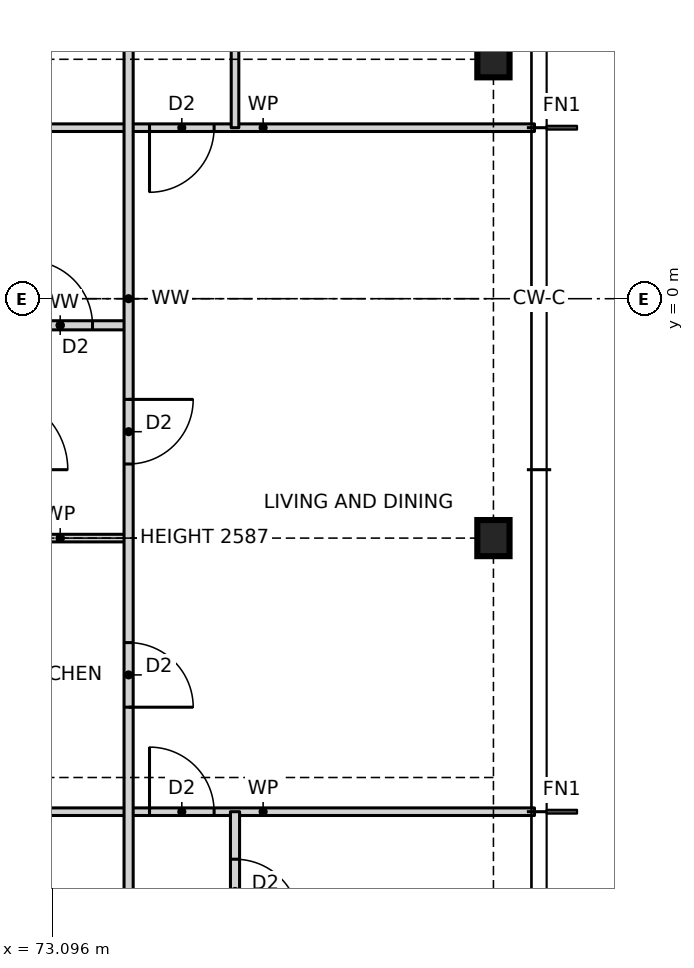
"""IFC4 building model, lengths in metres.
Left out: names, types, materials, properties, quantities, classifications, styles, units other than length and angle.
Written with IfcOpenShell. Run it as: python <this file> out.ifc"""

import sys

from ifc_helpers import new_model, si_unit, direction, frame, frame_2d, origin, origin_2d, place, context, subcontext, project, spatial, rectangle, i_section, extrude, element, fill, save


model = new_model("IFC4")
c1 = context("Model", 3, precision=1e-05, world=origin(), true_north=direction((0.0, 1.0)))
c2 = subcontext(c1, "Body", "Model", "MODEL_VIEW")
j1 = project(units=[si_unit("LENGTHUNIT", "METRE"), si_unit("PLANEANGLEUNIT", "RADIAN")], contexts=[c1])
p1 = place(None, origin())
s1 = spatial("IfcSite", under=j1, at=p1, CompositionType="ELEMENT")
p2 = place(p1, origin())
s2 = spatial("IfcBuilding", under=s1, at=p2, CompositionType="ELEMENT")
p3 = place(p2, frame((0.0, 0.0, 18.5)))
s3 = spatial("IfcBuildingStorey", under=s2, at=p3, CompositionType="ELEMENT", Elevation=18.5)
for number, where, z_axis, x_axis in (
    (1, (78.9, -3.15, 0.0), (0.0, 0.0, 1.0), (1.0, 0.0, 0.0)),
    (2, (78.9, 3.15, 0.0), (0.0, 0.0, 1.0), (1.0, 0.0, 0.0)),
):
    element("IfcColumn", number, at=place(p3, frame(where, z_axis=z_axis, x_axis=x_axis)), inside=s3, PredefinedType="COLUMN", context=c2, shape_type="SweptSolid", body=[
        extrude(i_section(OverallWidth=0.424, OverallDepth=0.475, WebThickness=0.048, FlangeThickness=0.077, at=origin_2d()), origin(), (0.0, 0.0, 1.0), 3.5),
    ])
p4 = place(p3, frame((72.3, -6.75, 0.0), z_axis=(0.0, 0.0, 1.0), x_axis=(1.0, 0.0, 0.0)))
e3 = element("IfcWall", 3, at=p4, inside=s3, PredefinedType="PARTITIONING", context=c2, shape_type="SweptSolid", body=[
    extrude(rectangle(XDim=7.14, YDim=0.1, at=frame_2d((3.57, 0.0))), origin(), (0.0, 0.0, 1.0), 3.27),
])
p5 = place(p4, frame((2.075, 0.0, 0.0)))
e4 = element("IfcOpeningElement", 4, at=p5, cuts=e3, PredefinedType="OPENING", context=c2, shape_type="SweptSolid", body=[
    extrude(rectangle(XDim=0.85, YDim=2.1, at=frame_2d((0.425, 1.05))), frame((0.0, 0.06, 0.0), z_axis=(0.0, -1.0, 0.0), x_axis=(1.0, 0.0, 0.0)), (0.0, 0.0, 1.0), 0.12),
])
p6 = place(p3, frame((72.3, -3.15, 0.0), z_axis=(0.0, 0.0, 1.0), x_axis=(1.0, 0.0, 0.0)))
e5 = element("IfcWall", 5, at=p6, inside=s3, PredefinedType="PARTITIONING", context=c2, shape_type="SweptSolid", body=[
    extrude(rectangle(XDim=1.8, YDim=0.1, at=frame_2d((0.9, 0.0))), origin(), (0.0, 0.0, 1.0), 2.587),
])
p7 = place(p3, frame((72.3, -0.35, 0.0), z_axis=(0.0, 0.0, 1.0), x_axis=(1.0, 0.0, 0.0)))
e6 = element("IfcWall", 6, at=p7, inside=s3, PredefinedType="PARTITIONING", context=c2, shape_type="SweptSolid", body=[
    extrude(rectangle(XDim=1.8, YDim=0.12, at=frame_2d((0.9, 0.0))), origin(), (0.0, 0.0, 1.0), 3.27),
])
p8 = place(p7, frame((0.475, 0.0, 0.0)))
e7 = element("IfcOpeningElement", 7, at=p8, cuts=e6, PredefinedType="OPENING", context=c2, shape_type="SweptSolid", body=[
    extrude(rectangle(XDim=0.85, YDim=2.1, at=frame_2d((0.425, 1.05))), frame((0.0, 0.07, 0.0), z_axis=(0.0, -1.0, 0.0), x_axis=(1.0, 0.0, 0.0)), (0.0, 0.0, 1.0), 0.14),
])
p9 = place(p3, frame((72.3, 2.25, 0.0), z_axis=(0.0, 0.0, 1.0), x_axis=(1.0, 0.0, 0.0)))
e8 = element("IfcWall", 8, at=p9, inside=s3, PredefinedType="PARTITIONING", context=c2, shape_type="SweptSolid", body=[
    extrude(rectangle(XDim=7.14, YDim=0.1, at=frame_2d((3.57, 0.0))), origin(), (0.0, 0.0, 1.0), 3.27),
])
p10 = place(p9, frame((2.075, 0.0, 0.0)))
e9 = element("IfcOpeningElement", 9, at=p10, cuts=e8, PredefinedType="OPENING", context=c2, shape_type="SweptSolid", body=[
    extrude(rectangle(XDim=0.85, YDim=2.1, at=frame_2d((0.425, 1.05))), frame((0.0, 0.06, 0.0), z_axis=(0.0, -1.0, 0.0), x_axis=(1.0, 0.0, 0.0)), (0.0, 0.0, 1.0), 0.12),
])
p11 = place(p3, frame((75.5, -13.45, 0.0), z_axis=(0.0, 0.0, 1.0), x_axis=(0.0, 1.0, 0.0)))
e10 = element("IfcWall", 10, at=p11, inside=s3, PredefinedType="PARTITIONING", context=c2, shape_type="SweptSolid", body=[
    extrude(rectangle(XDim=6.7, YDim=0.12, at=frame_2d((3.35, 0.0))), origin(), (0.0, 0.0, 1.0), 3.27),
])
p12 = place(p11, frame((5.225, 0.0, 0.0)))
e11 = element("IfcOpeningElement", 11, at=p12, cuts=e10, PredefinedType="OPENING", context=c2, shape_type="SweptSolid", body=[
    extrude(rectangle(XDim=0.85, YDim=2.1, at=frame_2d((0.425, 1.05))), frame((0.0, 0.07, 0.0), z_axis=(0.0, -1.0, 0.0), x_axis=(1.0, 0.0, 0.0)), (0.0, 0.0, 1.0), 0.14),
])
p13 = place(p11, frame((0.675, 0.0, 0.0)))
e12 = element("IfcOpeningElement", 12, at=p13, cuts=e10, PredefinedType="OPENING", context=c2, shape_type="SweptSolid", body=[
    extrude(rectangle(XDim=0.85, YDim=2.1, at=frame_2d((0.425, 1.05))), frame((0.0, 0.07, 0.0), z_axis=(0.0, -1.0, 0.0), x_axis=(1.0, 0.0, 0.0)), (0.0, 0.0, 1.0), 0.14),
])
p14 = place(p3, frame((75.5, 2.25, 0.0), z_axis=(0.0, 0.0, 1.0), x_axis=(0.0, 1.0, 0.0)))
e13 = element("IfcWall", 13, at=p14, inside=s3, PredefinedType="PARTITIONING", context=c2, shape_type="SweptSolid", body=[
    extrude(rectangle(XDim=11.2, YDim=0.1, at=frame_2d((5.6, 0.0))), origin(), (0.0, 0.0, 1.0), 3.27),
])
p15 = place(p14, frame((1.825, 0.0, 0.0)))
e14 = element("IfcOpeningElement", 14, at=p15, cuts=e13, PredefinedType="OPENING", context=c2, shape_type="SweptSolid", body=[
    extrude(rectangle(XDim=0.85, YDim=2.1, at=frame_2d((0.425, 1.05))), frame((0.0, 0.06, 0.0), z_axis=(0.0, -1.0, 0.0), x_axis=(1.0, 0.0, 0.0)), (0.0, 0.0, 1.0), 0.12),
])
p16 = place(p14, frame((6.325, 0.0, 0.0)))
e15 = element("IfcOpeningElement", 15, at=p16, cuts=e13, PredefinedType="OPENING", context=c2, shape_type="SweptSolid", body=[
    extrude(rectangle(XDim=0.85, YDim=2.1, at=frame_2d((0.425, 1.05))), frame((0.0, 0.06, 0.0), z_axis=(0.0, -1.0, 0.0), x_axis=(1.0, 0.0, 0.0)), (0.0, 0.0, 1.0), 0.12),
])
p17 = place(p14, frame((9.675, 0.0, 0.0)))
e16 = element("IfcOpeningElement", 16, at=p17, cuts=e13, PredefinedType="OPENING", context=c2, shape_type="SweptSolid", body=[
    extrude(rectangle(XDim=0.85, YDim=2.1, at=frame_2d((0.425, 1.05))), frame((0.0, 0.06, 0.0), z_axis=(0.0, -1.0, 0.0), x_axis=(1.0, 0.0, 0.0)), (0.0, 0.0, 1.0), 0.12),
])
p18 = place(p3, frame((74.1, -12.614, 0.0), z_axis=(0.0, 0.0, 1.0), x_axis=(0.0, 1.0, 0.0)))
e17 = element("IfcWall", 17, at=p18, inside=s3, PredefinedType="PARTITIONING", context=c2, shape_type="SweptSolid", body=[
    extrude(rectangle(XDim=25.228, YDim=0.12, at=frame_2d((12.614, 0.0))), origin(), (0.0, 0.0, 1.0), 3.27),
])
p19 = place(p18, frame((7.239, 0.0, 0.0)))
e18 = element("IfcOpeningElement", 18, at=p19, cuts=e17, PredefinedType="OPENING", context=c2, shape_type="SweptSolid", body=[
    extrude(rectangle(XDim=0.85, YDim=2.1, at=frame_2d((0.425, 1.05))), frame((0.0, 0.07, 0.0), z_axis=(0.0, -1.0, 0.0), x_axis=(1.0, 0.0, 0.0)), (0.0, 0.0, 1.0), 0.14),
])
p20 = place(p18, frame((10.439, 0.0, 0.0)))
e19 = element("IfcOpeningElement", 19, at=p20, cuts=e17, PredefinedType="OPENING", context=c2, shape_type="SweptSolid", body=[
    extrude(rectangle(XDim=0.85, YDim=2.1, at=frame_2d((0.425, 1.05))), frame((0.0, 0.07, 0.0), z_axis=(0.0, -1.0, 0.0), x_axis=(1.0, 0.0, 0.0)), (0.0, 0.0, 1.0), 0.14),
])
p21 = place(p18, frame((2.507, 0.0, 0.0)))
e20 = element("IfcOpeningElement", 20, at=p21, cuts=e17, PredefinedType="OPENING", context=c2, shape_type="SweptSolid", body=[
    extrude(rectangle(XDim=0.85, YDim=2.1, at=frame_2d((0.425, 1.05))), frame((0.0, 0.07, 0.0), z_axis=(0.0, -1.0, 0.0), x_axis=(1.0, 0.0, 0.0)), (0.0, 0.0, 1.0), 0.14),
])
p22 = place(p18, frame((16.639, 0.0, 0.0)))
e21 = element("IfcOpeningElement", 21, at=p22, cuts=e17, PredefinedType="OPENING", context=c2, shape_type="SweptSolid", body=[
    extrude(rectangle(XDim=0.85, YDim=2.1, at=frame_2d((0.425, 1.05))), frame((0.0, 0.07, 0.0), z_axis=(0.0, -1.0, 0.0), x_axis=(1.0, 0.0, 0.0)), (0.0, 0.0, 1.0), 0.14),
])
p23 = place(p18, frame((21.821, 0.0, 0.0)))
e22 = element("IfcOpeningElement", 22, at=p23, cuts=e17, PredefinedType="OPENING", context=c2, shape_type="SweptSolid", body=[
    extrude(rectangle(XDim=0.85, YDim=2.1, at=frame_2d((0.425, 1.05))), frame((0.0, 0.07, 0.0), z_axis=(0.0, -1.0, 0.0), x_axis=(1.0, 0.0, 0.0)), (0.0, 0.0, 1.0), 0.14),
])
p24 = place(p19, frame((0.85, 0.0, 0.0), z_axis=(0.0, 0.0, 1.0), x_axis=(-1.0, 0.0, 0.0)))
e23 = element("IfcDoor", 23, at=p24, inside=s3, OperationType="SINGLE_SWING_RIGHT", PredefinedType="DOOR", context=c2, shape_type="SweptSolid", body=[
    extrude(rectangle(XDim=0.85, YDim=2.1, at=frame_2d((0.425, 1.05))), frame((0.0, 0.025, 0.0), z_axis=(0.0, -1.0, 0.0), x_axis=(1.0, 0.0, 0.0)), (0.0, 0.0, 1.0), 0.05),
])
fill(e18, e23)
p25 = place(p20, frame((0.85, 0.0, 0.0), z_axis=(0.0, 0.0, 1.0), x_axis=(-1.0, 0.0, 0.0)))
e24 = element("IfcDoor", 24, at=p25, inside=s3, OperationType="SINGLE_SWING_LEFT", PredefinedType="DOOR", context=c2, shape_type="SweptSolid", body=[
    extrude(rectangle(XDim=0.85, YDim=2.1, at=frame_2d((0.425, 1.05))), frame((0.0, 0.025, 0.0), z_axis=(0.0, -1.0, 0.0), x_axis=(1.0, 0.0, 0.0)), (0.0, 0.0, 1.0), 0.05),
])
fill(e19, e24)
p26 = place(p8, origin())
e25 = element("IfcDoor", 25, at=p26, inside=s3, OperationType="SINGLE_SWING_LEFT", PredefinedType="DOOR", context=c2, shape_type="SweptSolid", body=[
    extrude(rectangle(XDim=0.85, YDim=2.1, at=frame_2d((0.425, 1.05))), frame((0.0, 0.025, 0.0), z_axis=(0.0, -1.0, 0.0), x_axis=(1.0, 0.0, 0.0)), (0.0, 0.0, 1.0), 0.05),
])
fill(e7, e25)
p27 = place(p5, origin())
e26 = element("IfcDoor", 26, at=p27, inside=s3, OperationType="SINGLE_SWING_LEFT", PredefinedType="DOOR", context=c2, shape_type="SweptSolid", body=[
    extrude(rectangle(XDim=0.85, YDim=2.1, at=frame_2d((0.425, 1.05))), frame((0.0, 0.025, 0.0), z_axis=(0.0, -1.0, 0.0), x_axis=(1.0, 0.0, 0.0)), (0.0, 0.0, 1.0), 0.05),
])
fill(e4, e26)
p28 = place(p12, frame((0.85, 0.0, 0.0), z_axis=(0.0, 0.0, 1.0), x_axis=(-1.0, 0.0, 0.0)))
e27 = element("IfcDoor", 27, at=p28, inside=s3, OperationType="SINGLE_SWING_RIGHT", PredefinedType="DOOR", context=c2, shape_type="SweptSolid", body=[
    extrude(rectangle(XDim=0.85, YDim=2.1, at=frame_2d((0.425, 1.05))), frame((0.0, 0.025, 0.0), z_axis=(0.0, -1.0, 0.0), x_axis=(1.0, 0.0, 0.0)), (0.0, 0.0, 1.0), 0.05),
])
fill(e11, e27)
p29 = place(p10, frame((0.85, 0.0, 0.0), z_axis=(0.0, 0.0, 1.0), x_axis=(-1.0, 0.0, 0.0)))
e28 = element("IfcDoor", 28, at=p29, inside=s3, OperationType="SINGLE_SWING_RIGHT", PredefinedType="DOOR", context=c2, shape_type="SweptSolid", body=[
    extrude(rectangle(XDim=0.85, YDim=2.1, at=frame_2d((0.425, 1.05))), frame((0.0, 0.025, 0.0), z_axis=(0.0, -1.0, 0.0), x_axis=(1.0, 0.0, 0.0)), (0.0, 0.0, 1.0), 0.05),
])
fill(e9, e28)
save(model, sys.argv[1])
